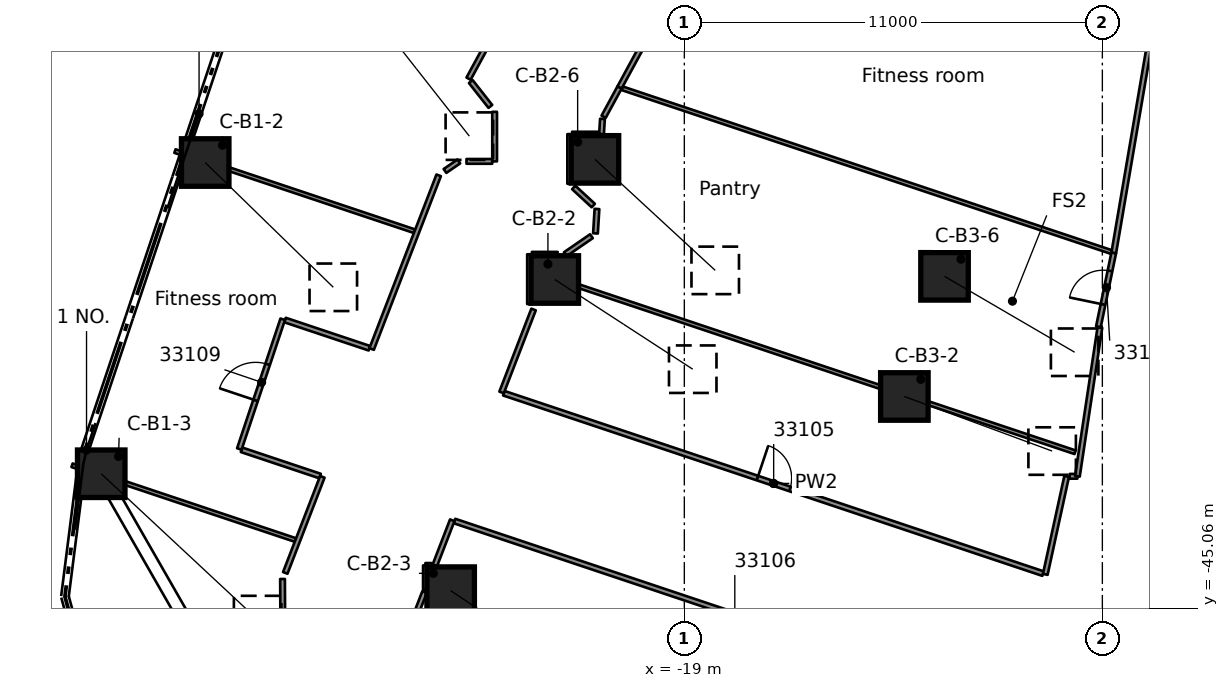
"""IFC4 building model, lengths in metres.
Left out: names, types, materials, properties, quantities, classifications, styles, units other than length and angle.
Written with IfcOpenShell. Run it as: python <this file> out.ifc"""

import sys

from ifc_helpers import new_model, si_unit, direction, frame, frame_2d, origin, origin_2d, place, context, subcontext, project, spatial, rectangle, extrude, element, fill, save


model = new_model("IFC4")
c1 = context("Model", 3, precision=1e-05, world=origin(), true_north=direction((0.0, 1.0)))
c2 = subcontext(c1, "Body", "Model", "MODEL_VIEW")
j1 = project(units=[si_unit("LENGTHUNIT", "METRE"), si_unit("PLANEANGLEUNIT", "RADIAN")], contexts=[c1])
p1 = place(None, origin())
s1 = spatial("IfcSite", under=j1, at=p1, CompositionType="ELEMENT")
p2 = place(p1, origin())
s2 = spatial("IfcBuilding", under=s1, at=p2, CompositionType="ELEMENT")
p3 = place(p2, frame((0.0, 0.0, 163.1)))
s3 = spatial("IfcBuildingStorey", under=s2, at=p3, CompositionType="ELEMENT", Elevation=163.1)
p4 = place(p3, frame((-31.608, -33.326, 0.53), z_axis=(0.607559866348, -0.591718513999, 0.529849232324), x_axis=(0.697705693027, 0.716384509825, 0.0)))
e1 = element("IfcColumn", 1, at=p4, inside=s3, PredefinedType="COLUMN", context=c2, shape_type="SweptSolid", body=[
    extrude(rectangle(XDim=1.25, YDim=1.25, at=origin_2d()), origin(), (0.0, 0.0, 1.0), 5.548),
])
p5 = place(p3, frame((-34.344, -41.515, 0.556), z_axis=(0.650749520323, -0.606668854079, 0.456593871279), x_axis=(0.681899220361, 0.731446138326, 0.0)))
e2 = element("IfcColumn", 2, at=p5, inside=s3, PredefinedType="COLUMN", context=c2, shape_type="SweptSolid", body=[
    extrude(rectangle(XDim=1.25, YDim=1.25, at=origin_2d()), origin(), (0.0, 0.0, 1.0), 6.325),
])
p6 = place(p3, frame((-27.441, -29.089, 0.523), z_axis=(0.516674188165, -0.657544139143, 0.548346139189), x_axis=(0.786299536886, 0.61784548092, 0.0)))
e3 = element("IfcColumn", 3, at=p6, inside=s3, PredefinedType="COLUMN", context=c2, shape_type="SweptSolid", body=[
    extrude(rectangle(XDim=1.25, YDim=1.25, at=origin_2d()), origin(), (0.0, 0.0, 1.0), 5.388),
])
p7 = place(p3, frame((-22.409, -36.404, 0.515), z_axis=(0.691420299182, -0.449506901526, 0.565580688637), x_axis=(0.545059702489, 0.838397233251, 0.0)))
e4 = element("IfcColumn", 4, at=p7, inside=s3, PredefinedType="COLUMN", context=c2, shape_type="SweptSolid", body=[
    extrude(rectangle(XDim=1.25, YDim=1.25, at=origin_2d()), origin(), (0.0, 0.0, 1.0), 5.25),
])
p8 = place(p3, frame((-25.149, -44.591, 0.547), z_axis=(0.728513829008, -0.485242537011, 0.483536225343), x_axis=(0.554357406679, 0.832278718735, 0.0)))
e5 = element("IfcColumn", 5, at=p8, inside=s3, PredefinedType="COLUMN", context=c2, shape_type="SweptSolid", body=[
    extrude(rectangle(XDim=1.25, YDim=1.25, at=origin_2d()), origin(), (0.0, 0.0, 1.0), 6.009),
])
p9 = place(p3, frame((-21.352, -33.243, 0.514), z_axis=(0.60490275207, -0.558289218491, 0.567807898021), x_axis=(0.678225952127, 0.734853426107, 0.0)))
e6 = element("IfcColumn", 6, at=p9, inside=s3, PredefinedType="COLUMN", context=c2, shape_type="SweptSolid", body=[
    extrude(rectangle(XDim=1.25, YDim=1.25, at=origin_2d()), origin(), (0.0, 0.0, 1.0), 5.232),
])
p10 = place(p3, frame((-13.21, -39.482, 0.507), z_axis=(0.761221861234, -0.281091530402, 0.58440467958), x_axis=(0.346401191704, 0.938086464238, 0.0)))
e7 = element("IfcColumn", 7, at=p10, inside=s3, PredefinedType="COLUMN", context=c2, shape_type="SweptSolid", body=[
    extrude(rectangle(XDim=1.25, YDim=1.25, at=origin_2d()), origin(), (0.0, 0.0, 1.0), 5.109),
])
p11 = place(p3, frame((-12.153, -36.321, 0.498), z_axis=(0.688479389186, -0.401551615226, 0.603947374343), x_axis=(0.503813582117, 0.863812406992, 0.0)))
e8 = element("IfcColumn", 8, at=p11, inside=s3, PredefinedType="COLUMN", context=c2, shape_type="SweptSolid", body=[
    extrude(rectangle(XDim=1.25, YDim=1.25, at=origin_2d()), origin(), (0.0, 0.0, 1.0), 4.973),
])
p12 = place(p3, frame((-24.619, -31.196, 0.0), z_axis=(0.0, 0.0, 1.0), x_axis=(0.618559606331, -0.785737878313, 0.0)))
e9 = element("IfcWall", 9, at=p12, inside=s3, PredefinedType="PARTITIONING", context=c2, shape_type="SweptSolid", body=[
    extrude(rectangle(XDim=0.833, YDim=0.125, at=frame_2d((0.416, 0.0))), origin(), (0.0, 0.0, 1.0), 3.56),
])
p13 = place(p3, frame((-21.911, -33.982, 0.0), z_axis=(0.0, 0.0, 1.0), x_axis=(0.734242598688, -0.678887182286, 0.0)))
e10 = element("IfcWall", 10, at=p13, inside=s3, PredefinedType="PARTITIONING", context=c2, shape_type="SweptSolid", body=[
    extrude(rectangle(XDim=0.701, YDim=0.125, at=frame_2d((0.351, 0.0))), origin(), (0.0, 0.0, 1.0), 3.56),
])
p14 = place(p3, frame((-35.112, -41.292, 0.0), z_axis=(0.0, 0.0, 1.0), x_axis=(0.948312413327, -0.317338252863, 0.0)))
e11 = element("IfcWall", 11, at=p14, inside=s3, PredefinedType="PARTITIONING", context=c2, shape_type="SweptSolid", body=[
    extrude(rectangle(XDim=6.198, YDim=0.1, at=frame_2d((3.099, 0.0))), origin(), (0.0, 0.0, 1.0), 3.56),
])
p15 = place(p3, frame((-30.651, -40.885, 0.0), z_axis=(0.0, 0.0, 1.0), x_axis=(0.948414092201, -0.317034240601, 0.0)))
e12 = element("IfcWall", 12, at=p15, inside=s3, PredefinedType="PARTITIONING", context=c2, shape_type="SweptSolid", body=[
    extrude(rectangle(XDim=2.179, YDim=0.125, at=frame_2d((1.09, 0.0))), origin(), (0.0, 0.0, 1.0), 3.56),
])
p16 = place(p3, frame((-10.334, -47.682, 0.0), z_axis=(0.0, 0.0, 1.0), x_axis=(-0.948331823852, 0.317280241852, 0.0)))
e13 = element("IfcWall", 13, at=p16, inside=s3, PredefinedType="PARTITIONING", context=c2, shape_type="SweptSolid", body=[
    extrude(rectangle(XDim=15.516, YDim=0.125, at=frame_2d((7.758, 0.0))), origin(), (0.0, 0.0, 1.0), 3.56),
])
p17 = place(p16, frame((7.288, 0.0, 0.0)))
e14 = element("IfcOpeningElement", 14, at=p17, cuts=e13, PredefinedType="OPENING", context=c2, shape_type="SweptSolid", body=[
    extrude(rectangle(XDim=0.9, YDim=2.1, at=frame_2d((0.45, 1.05))), frame((0.0, 0.073, 0.0), z_axis=(0.0, -1.0, 0.0), x_axis=(1.0, 0.0, 0.0)), (0.0, 0.0, 1.0), 0.145),
])
p18 = place(p3, frame((-29.508, -37.47, 0.0), z_axis=(0.0, 0.0, 1.0), x_axis=(0.948349174774, -0.31722837626, 0.0)))
e15 = element("IfcWall", 15, at=p18, inside=s3, PredefinedType="PARTITIONING", context=c2, shape_type="SweptSolid", body=[
    extrude(rectangle(XDim=2.342, YDim=0.125, at=frame_2d((1.171, 0.0))), origin(), (0.0, 0.0, 1.0), 3.56),
])
p19 = place(p3, frame((-23.75, -39.396, 0.0), z_axis=(0.0, 0.0, 1.0), x_axis=(0.948333527716, -0.317275149057, 0.0)))
e16 = element("IfcWall", 16, at=p19, inside=s3, PredefinedType="PARTITIONING", context=c2, shape_type="SweptSolid", body=[
    extrude(rectangle(XDim=14.962, YDim=0.125, at=frame_2d((7.481, 0.0))), origin(), (0.0, 0.0, 1.0), 3.56),
])
p20 = place(p19, frame((7.038, 0.0, 0.0)))
e17 = element("IfcOpeningElement", 17, at=p20, cuts=e16, PredefinedType="OPENING", context=c2, shape_type="SweptSolid", body=[
    extrude(rectangle(XDim=0.9, YDim=2.1, at=frame_2d((0.45, 1.05))), frame((0.0, 0.073, 0.0), z_axis=(0.0, -1.0, 0.0), x_axis=(1.0, 0.0, 0.0)), (0.0, 0.0, 1.0), 0.145),
])
p21 = place(p3, frame((-32.404, -33.025, 0.0), z_axis=(0.0, 0.0, 1.0), x_axis=(0.948344914512, -0.317241111964, 0.0)))
e18 = element("IfcWall", 18, at=p21, inside=s3, PredefinedType="PARTITIONING", context=c2, shape_type="SweptSolid", body=[
    extrude(rectangle(XDim=6.648, YDim=0.1, at=frame_2d((3.324, 0.0))), origin(), (0.0, 0.0, 1.0), 3.56),
])
p22 = place(p3, frame((-22.995, -36.173, 0.0), z_axis=(0.0, 0.0, 1.0), x_axis=(0.948340615741, -0.317253962207, 0.0)))
e19 = element("IfcWall", 19, at=p22, inside=s3, PredefinedType="PARTITIONING", context=c2, shape_type="SweptSolid", body=[
    extrude(rectangle(XDim=15.057, YDim=0.1, at=frame_2d((7.528, 0.0))), origin(), (0.0, 0.0, 1.0), 3.56),
])
p23 = place(p3, frame((-20.635, -31.373, 0.0), z_axis=(0.0, 0.0, 1.0), x_axis=(0.948310437163, -0.317344158238, 0.0)))
e20 = element("IfcWall", 20, at=p23, inside=s3, PredefinedType="PARTITIONING", context=c2, shape_type="SweptSolid", body=[
    extrude(rectangle(XDim=13.578, YDim=0.1, at=frame_2d((6.789, 0.0))), origin(), (0.0, 0.0, 1.0), 3.56),
])
p24 = place(p3, frame((-25.813, -43.927, 0.0), z_axis=(0.0, 0.0, 1.0), x_axis=(1.0, 0.0, 0.0)))
e21 = element("IfcWall", 21, at=p24, inside=s3, PredefinedType="PARTITIONING", context=c2, shape_type="SweptSolid", body=[
    extrude(rectangle(XDim=0.157, YDim=0.125, at=frame_2d((0.079, 0.0))), origin(), (0.0, 0.0, 1.0), 3.56),
])
p25 = place(p3, frame((-8.861, -41.582, 0.0), z_axis=(0.0, 0.0, 1.0), x_axis=(1.0, 0.0, 0.0)))
e22 = element("IfcWall", 22, at=p25, inside=s3, PredefinedType="PARTITIONING", context=c2, shape_type="SweptSolid", body=[
    extrude(rectangle(XDim=0.204, YDim=0.125, at=frame_2d((0.102, 0.0))), origin(), (0.0, 0.0, 1.0), 3.56),
])
for number, where, z_axis, x_axis in (
    (23, (-23.011, -35.74, 0.0), (0.0, 0.0, 1.0), (1.0, 0.0, 0.0)),
    (24, (-24.732, -33.296, 0.0), (0.0, 0.0, 1.0), (1.0, 0.0, 0.0)),
):
    element("IfcWall", number, at=place(p3, frame(where, z_axis=z_axis, x_axis=x_axis)), inside=s3, PredefinedType="PARTITIONING", context=c2, shape_type="SweptSolid", body=[
        extrude(rectangle(XDim=0.677, YDim=0.125, at=frame_2d((0.338, 0.0))), origin(), (0.0, 0.0, 1.0), 3.56),
    ])
p26 = place(p3, frame((-21.953, -32.579, 0.0), z_axis=(0.0, 0.0, 1.0), x_axis=(1.0, 0.0, 0.0)))
e25 = element("IfcWall", 25, at=p26, inside=s3, PredefinedType="PARTITIONING", context=c2, shape_type="SweptSolid", body=[
    extrude(rectangle(XDim=0.712, YDim=0.125, at=frame_2d((0.356, 0.0))), origin(), (0.0, 0.0, 1.0), 3.56),
])
p27 = place(p3, frame((-22.133, -35.739, 0.0), z_axis=(0.0, 0.0, 1.0), x_axis=(0.823786317289, 0.566900435215, 0.0)))
e26 = element("IfcWall", 26, at=p27, inside=s3, PredefinedType="PARTITIONING", context=c2, shape_type="SweptSolid", body=[
    extrude(rectangle(XDim=0.836, YDim=0.125, at=frame_2d((0.418, 0.0))), origin(), (0.0, 0.0, 1.0), 3.56),
])
p28 = place(p3, frame((-25.298, -33.548, 0.0), z_axis=(0.0, 0.0, 1.0), x_axis=(0.823993675882, 0.566598995857, 0.0)))
e27 = element("IfcWall", 27, at=p28, inside=s3, PredefinedType="PARTITIONING", context=c2, shape_type="SweptSolid", body=[
    extrude(rectangle(XDim=0.443, YDim=0.125, at=frame_2d((0.221, 0.0))), origin(), (0.0, 0.0, 1.0), 3.56),
])
p29 = place(p3, frame((-21.124, -32.122, 0.0), z_axis=(0.0, 0.0, 1.0), x_axis=(0.47783965022, 0.878447077904, 0.0)))
e28 = element("IfcWall", 28, at=p29, inside=s3, PredefinedType="PARTITIONING", context=c2, shape_type="SweptSolid", body=[
    extrude(rectangle(XDim=0.879, YDim=0.125, at=frame_2d((0.439, 0.0))), origin(), (0.0, 0.0, 1.0), 3.56),
])
p30 = place(p3, frame((-18.259, -26.854, 0.0), z_axis=(0.0, 0.0, 1.0), x_axis=(-0.477745466433, -0.878498303528, 0.0)))
e29 = element("IfcWall", 29, at=p30, inside=s3, PredefinedType="PARTITIONING", context=c2, shape_type="SweptSolid", body=[
    extrude(rectangle(XDim=5.118, YDim=0.125, at=frame_2d((2.559, 0.0))), origin(), (0.0, 0.0, 1.0), 3.56),
])
p31 = place(p30, frame((2.038, 0.0, 0.0)))
e30 = element("IfcOpeningElement", 30, at=p31, cuts=e29, PredefinedType="OPENING", context=c2, shape_type="SweptSolid", body=[
    extrude(rectangle(XDim=1.1, YDim=2.1, at=frame_2d((0.55, 1.05))), frame((0.0, 0.073, 0.0), z_axis=(0.0, -1.0, 0.0), x_axis=(1.0, 0.0, 0.0)), (0.0, 0.0, 1.0), 0.145),
])
p32 = place(p3, frame((-24.678, -31.12, 0.0), z_axis=(0.0, 0.0, 1.0), x_axis=(0.477944124061, 0.878390240312, 0.0)))
e31 = element("IfcWall", 31, at=p32, inside=s3, PredefinedType="PARTITIONING", context=c2, shape_type="SweptSolid", body=[
    extrude(rectangle(XDim=3.072, YDim=0.125, at=frame_2d((1.536, 0.0))), origin(), (0.0, 0.0, 1.0), 3.56),
])
p33 = place(p3, frame((-23.809, -39.376, 0.0), z_axis=(0.0, 0.0, 1.0), x_axis=(0.359901914005, 0.932990145873, 0.0)))
e32 = element("IfcWall", 32, at=p33, inside=s3, PredefinedType="PARTITIONING", context=c2, shape_type="SweptSolid", body=[
    extrude(rectangle(XDim=2.34, YDim=0.125, at=frame_2d((1.17, 0.0))), origin(), (0.0, 0.0, 1.0), 3.56),
])
p34 = place(p3, frame((-26.142, -45.421, 0.0), z_axis=(0.0, 0.0, 1.0), x_axis=(0.360172075404, 0.932885885894, 0.0)))
e33 = element("IfcWall", 33, at=p34, inside=s3, PredefinedType="PARTITIONING", context=c2, shape_type="SweptSolid", body=[
    extrude(rectangle(XDim=0.85, YDim=0.125, at=frame_2d((0.425, 0.0))), origin(), (0.0, 0.0, 1.0), 3.56),
])
p35 = place(p3, frame((-25.565, -43.926, 0.0), z_axis=(0.0, 0.0, 1.0), x_axis=(0.359981832882, 0.932959313151, 0.0)))
e34 = element("IfcWall", 34, at=p35, inside=s3, PredefinedType="PARTITIONING", context=c2, shape_type="SweptSolid", body=[
    extrude(rectangle(XDim=1.272, YDim=0.125, at=frame_2d((0.636, 0.0))), origin(), (0.0, 0.0, 1.0), 3.56),
])
p36 = place(p3, frame((-28.525, -41.596, 0.0), z_axis=(0.0, 0.0, 1.0), x_axis=(-0.360180137792, -0.932882773096, 0.0)))
e35 = element("IfcWall", 35, at=p36, inside=s3, PredefinedType="PARTITIONING", context=c2, shape_type="SweptSolid", body=[
    extrude(rectangle(XDim=2.71, YDim=0.125, at=frame_2d((1.355, 0.0))), origin(), (0.0, 0.0, 1.0), 3.56),
])
p37 = place(p3, frame((-25.464, -33.663, 0.0), z_axis=(0.0, 0.0, 1.0), x_axis=(-0.360097663696, -0.932914611634, 0.0)))
e36 = element("IfcWall", 36, at=p37, inside=s3, PredefinedType="PARTITIONING", context=c2, shape_type="SweptSolid", body=[
    extrude(rectangle(XDim=4.898, YDim=0.125, at=frame_2d((2.449, 0.0))), origin(), (0.0, 0.0, 1.0), 3.56),
])
p38 = place(p3, frame((-30.71, -40.864, 0.0), z_axis=(0.0, 0.0, 1.0), x_axis=(0.317183836314, 0.948364072485, 0.0)))
e37 = element("IfcWall", 37, at=p38, inside=s3, PredefinedType="PARTITIONING", context=c2, shape_type="SweptSolid", body=[
    extrude(rectangle(XDim=3.6, YDim=0.125, at=frame_2d((1.8, 0.0))), origin(), (0.0, 0.0, 1.0), 3.56),
])
p39 = place(p38, frame((1.35, 0.0, 0.0)))
e38 = element("IfcOpeningElement", 38, at=p39, cuts=e37, PredefinedType="OPENING", context=c2, shape_type="SweptSolid", body=[
    extrude(rectangle(XDim=1.0, YDim=2.1, at=frame_2d((0.5, 1.05))), frame((0.0, 0.073, 0.0), z_axis=(0.0, -1.0, 0.0), x_axis=(1.0, 0.0, 0.0)), (0.0, 0.0, 1.0), 0.145),
])
p40 = place(p3, frame((-9.502, -44.163, 0.0), z_axis=(0.0, 0.0, 1.0), x_axis=(0.213189538539, 0.977010860051, 0.0)))
e39 = element("IfcWall", 39, at=p40, inside=s3, PredefinedType="PARTITIONING", context=c2, shape_type="SweptSolid", body=[
    extrude(rectangle(XDim=2.641, YDim=0.125, at=frame_2d((1.32, 0.0))), origin(), (0.0, 0.0, 1.0), 3.56),
])
p41 = place(p3, frame((-8.657, -41.582, 0.0), z_axis=(0.0, 0.0, 1.0), x_axis=(0.149631731306, 0.988741798948, 0.0)))
e40 = element("IfcWall", 40, at=p41, inside=s3, PredefinedType="PARTITIONING", context=c2, shape_type="SweptSolid", body=[
    extrude(rectangle(XDim=3.957, YDim=0.125, at=frame_2d((1.978, 0.0))), origin(), (0.0, 0.0, 1.0), 3.56),
])
p42 = place(p3, frame((-8.104, -37.647, 0.0), z_axis=(0.0, 0.0, 1.0), x_axis=(0.20338984767, 0.979097834675, 0.0)))
e41 = element("IfcWall", 41, at=p42, inside=s3, PredefinedType="PARTITIONING", context=c2, shape_type="SweptSolid", body=[
    extrude(rectangle(XDim=1.987, YDim=0.125, at=frame_2d((0.993, 0.0))), origin(), (0.0, 0.0, 1.0), 3.56),
])
p43 = place(p42, frame((0.6, 0.0, 0.0)))
e42 = element("IfcOpeningElement", 42, at=p43, cuts=e41, PredefinedType="OPENING", context=c2, shape_type="SweptSolid", body=[
    extrude(rectangle(XDim=0.9, YDim=2.1, at=frame_2d((0.45, 1.05))), frame((0.0, 0.073, 0.0), z_axis=(0.0, -1.0, 0.0), x_axis=(1.0, 0.0, 0.0)), (0.0, 0.0, 1.0), 0.145),
])
p44 = place(p3, frame((-7.7, -35.702, 0.0), z_axis=(0.0, 0.0, 1.0), x_axis=(0.168640011859, 0.985677709193, 0.0)))
e43 = element("IfcWall", 43, at=p44, inside=s3, PredefinedType="PARTITIONING", context=c2, shape_type="SweptSolid", body=[
    extrude(rectangle(XDim=5.692, YDim=0.125, at=frame_2d((2.846, 0.0))), origin(), (0.0, 0.0, 1.0), 3.56),
])
p45 = place(p3, frame((-21.179, -32.578, 0.0), z_axis=(0.0, 0.0, 1.0), x_axis=(0.06199985879, 0.998076158171, 0.0)))
e44 = element("IfcWall", 44, at=p45, inside=s3, PredefinedType="PARTITIONING", context=c2, shape_type="SweptSolid", body=[
    extrude(rectangle(XDim=0.402, YDim=0.125, at=frame_2d((0.201, 0.0))), origin(), (0.0, 0.0, 1.0), 3.56),
])
p46 = place(p3, frame((-21.338, -35.191, 0.0), z_axis=(0.0, 0.0, 1.0), x_axis=(0.060277585587, 0.998181653145, 0.0)))
e45 = element("IfcWall", 45, at=p46, inside=s3, PredefinedType="PARTITIONING", context=c2, shape_type="SweptSolid", body=[
    extrude(rectangle(XDim=0.644, YDim=0.125, at=frame_2d((0.322, 0.0))), origin(), (0.0, 0.0, 1.0), 3.56),
])
p47 = place(p3, frame((-22.016, -33.885, 0.0), z_axis=(0.0, 0.0, 1.0), x_axis=(0.0, 1.0, 0.0)))
e46 = element("IfcWall", 46, at=p47, inside=s3, PredefinedType="PARTITIONING", context=c2, shape_type="SweptSolid", body=[
    extrude(rectangle(XDim=1.306, YDim=0.125, at=frame_2d((0.653, 0.0))), origin(), (0.0, 0.0, 1.0), 3.56),
])
p48 = place(p3, frame((-23.073, -37.05, 0.0), z_axis=(0.0, 0.0, 1.0), x_axis=(0.0, 1.0, 0.0)))
e47 = element("IfcWall", 47, at=p48, inside=s3, PredefinedType="PARTITIONING", context=c2, shape_type="SweptSolid", body=[
    extrude(rectangle(XDim=1.31, YDim=0.125, at=frame_2d((0.655, 0.0))), origin(), (0.0, 0.0, 1.0), 3.56),
])
p49 = place(p3, frame((-23.992, -33.296, 0.0), z_axis=(0.0, 0.0, 1.0), x_axis=(0.0, 1.0, 0.0)))
e48 = element("IfcWall", 48, at=p49, inside=s3, PredefinedType="PARTITIONING", context=c2, shape_type="SweptSolid", body=[
    extrude(rectangle(XDim=1.304, YDim=0.125, at=frame_2d((0.652, 0.0))), origin(), (0.0, 0.0, 1.0), 3.56),
])
p50 = place(p3, frame((-25.813, -44.569, 0.0), z_axis=(0.0, 0.0, 1.0), x_axis=(0.0, 1.0, 0.0)))
e49 = element("IfcWall", 49, at=p50, inside=s3, PredefinedType="PARTITIONING", context=c2, shape_type="SweptSolid", body=[
    extrude(rectangle(XDim=0.642, YDim=0.125, at=frame_2d((0.321, 0.0))), origin(), (0.0, 0.0, 1.0), 3.56),
])
p51 = place(p3, frame((-29.563, -46.016, 0.0), z_axis=(0.0, 0.0, 1.0), x_axis=(-0.005778620923, 0.999983303631, 0.0)))
e50 = element("IfcWall", 50, at=p51, inside=s3, PredefinedType="PARTITIONING", context=c2, shape_type="SweptSolid", body=[
    extrude(rectangle(XDim=1.732, YDim=0.125, at=frame_2d((0.866, 0.0))), origin(), (0.0, 0.0, 1.0), 3.56),
])
p52 = place(p43, origin())
e51 = element("IfcDoor", 51, at=p52, inside=s3, OperationType="SINGLE_SWING_RIGHT", PredefinedType="DOOR", context=c2, shape_type="SweptSolid", body=[
    extrude(rectangle(XDim=0.9, YDim=2.1, at=frame_2d((0.45, 1.05))), frame((0.0, 0.025, 0.0), z_axis=(0.0, -1.0, 0.0), x_axis=(1.0, 0.0, 0.0)), (0.0, 0.0, 1.0), 0.05),
])
fill(e42, e51)
p53 = place(p20, origin())
e52 = element("IfcDoor", 52, at=p53, inside=s3, OperationType="SINGLE_SWING_RIGHT", PredefinedType="DOOR", context=c2, shape_type="SweptSolid", body=[
    extrude(rectangle(XDim=0.9, YDim=2.1, at=frame_2d((0.45, 1.05))), frame((0.0, 0.025, 0.0), z_axis=(0.0, -1.0, 0.0), x_axis=(1.0, 0.0, 0.0)), (0.0, 0.0, 1.0), 0.05),
])
fill(e17, e52)
p54 = place(p17, origin())
e53 = element("IfcDoor", 53, at=p54, inside=s3, OperationType="SINGLE_SWING_LEFT", PredefinedType="DOOR", context=c2, shape_type="SweptSolid", body=[
    extrude(rectangle(XDim=0.9, YDim=2.1, at=frame_2d((0.45, 1.05))), frame((0.0, 0.025, 0.0), z_axis=(0.0, -1.0, 0.0), x_axis=(1.0, 0.0, 0.0)), (0.0, 0.0, 1.0), 0.05),
])
fill(e14, e53)
p55 = place(p39, origin())
e54 = element("IfcDoor", 54, at=p55, inside=s3, OperationType="SINGLE_SWING_RIGHT", PredefinedType="DOOR", context=c2, shape_type="SweptSolid", body=[
    extrude(rectangle(XDim=1.0, YDim=2.1, at=frame_2d((0.5, 1.05))), frame((0.0, 0.025, 0.0), z_axis=(0.0, -1.0, 0.0), x_axis=(1.0, 0.0, 0.0)), (0.0, 0.0, 1.0), 0.05),
])
fill(e38, e54)
save(model, sys.argv[1])
